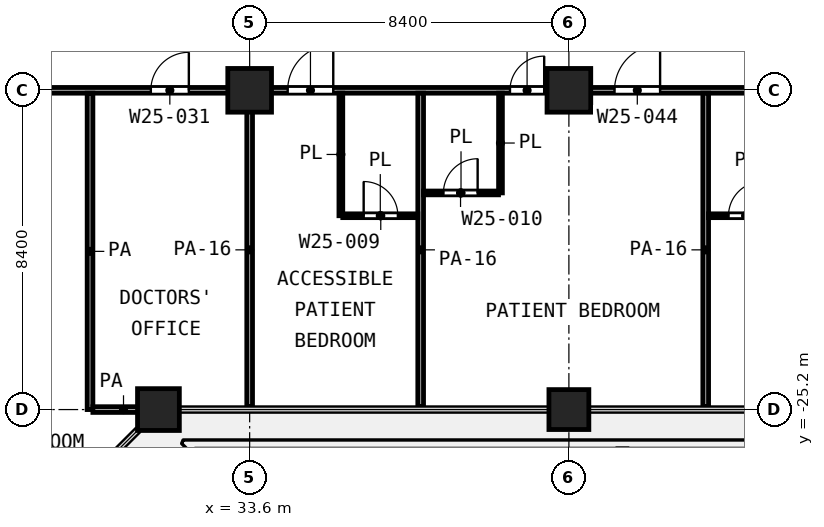
"""IFC4 building model, lengths in metres.
Left out: names, types, materials, properties, quantities, classifications, styles, units other than length and angle.
Written with IfcOpenShell. Run it as: python <this file> out.ifc"""

import sys

from ifc_helpers import new_model, si_unit, direction, frame, frame_2d, origin, origin_2d, place, context, subcontext, project, spatial, rectangle, extrude, element, fill, save


model = new_model("IFC4")
c1 = context("Model", 3, precision=1e-05, world=origin(), true_north=direction((0.0, 1.0)))
c2 = subcontext(c1, "Body", "Model", "MODEL_VIEW")
j1 = project(units=[si_unit("LENGTHUNIT", "METRE"), si_unit("PLANEANGLEUNIT", "RADIAN")], contexts=[c1])
p1 = place(None, origin())
s1 = spatial("IfcSite", under=j1, at=p1, CompositionType="ELEMENT")
p2 = place(p1, origin())
s2 = spatial("IfcBuilding", under=s1, at=p2, CompositionType="ELEMENT")
p3 = place(p2, frame((0.0, 0.0, 111.4)))
s3 = spatial("IfcBuildingStorey", under=s2, at=p3, CompositionType="ELEMENT", Elevation=111.4)
for number, where, z_axis, x_axis in (
    (1, (33.6, -16.8, 0.0), (0.0, 0.0, 1.0), (1.0, 0.0, 0.0)),
    (2, (42.0, -16.8, 0.0), (0.0, 0.0, 1.0), (1.0, 0.0, 0.0)),
):
    element("IfcColumn", number, at=place(p3, frame(where, z_axis=z_axis, x_axis=x_axis)), inside=s3, PredefinedType="COLUMN", context=c2, shape_type="SweptSolid", body=[
        extrude(rectangle(XDim=1.15, YDim=1.15, at=origin_2d()), origin(), (0.0, 0.0, 1.0), 4.2),
    ])
p4 = place(p3, frame((31.2, -25.2, 0.0), z_axis=(0.0, 0.0, 1.0), x_axis=(1.0, 0.0, 0.0)))
e3 = element("IfcColumn", 3, at=p4, inside=s3, PredefinedType="COLUMN", context=c2, shape_type="SweptSolid", body=[
    extrude(rectangle(XDim=1.1, YDim=1.1, at=origin_2d()), origin(), (0.0, 0.0, 1.0), 4.2),
])
p5 = place(p3, frame((42.0, -25.2, 0.0), z_axis=(0.0, 0.0, 1.0), x_axis=(1.0, 0.0, 0.0)))
e4 = element("IfcColumn", 4, at=p5, inside=s3, PredefinedType="COLUMN", context=c2, shape_type="SweptSolid", body=[
    extrude(rectangle(XDim=1.05, YDim=1.05, at=origin_2d()), origin(), (0.0, 0.0, 1.0), 4.2),
])
p6 = place(p3, frame((36.05, -20.1, 0.0), z_axis=(0.0, 0.0, 1.0), x_axis=(1.0, 0.0, 0.0)))
e5 = element("IfcWall", 5, at=p6, inside=s3, PredefinedType="PARTITIONING", context=c2, shape_type="SweptSolid", body=[
    extrude(rectangle(XDim=1.975, YDim=0.1, at=frame_2d((0.987, 0.0))), origin(), (0.0, 0.0, 1.0), 3.6),
])
p7 = place(p6, frame((0.55, 0.0, 0.0)))
e6 = element("IfcOpeningElement", 6, at=p7, cuts=e5, PredefinedType="OPENING", context=c2, shape_type="SweptSolid", body=[
    extrude(rectangle(XDim=0.9, YDim=2.1, at=frame_2d((0.45, 1.05))), frame((0.0, 0.06, 0.0), z_axis=(0.0, -1.0, 0.0), x_axis=(1.0, 0.0, 0.0)), (0.0, 0.0, 1.0), 0.12),
])
p8 = place(p3, frame((45.675, -20.1, 0.0), z_axis=(0.0, 0.0, 1.0), x_axis=(1.0, 0.0, 0.0)))
e7 = element("IfcWall", 7, at=p8, inside=s3, PredefinedType="PARTITIONING", context=c2, shape_type="SweptSolid", body=[
    extrude(rectangle(XDim=1.975, YDim=0.1, at=frame_2d((0.987, 0.0))), origin(), (0.0, 0.0, 1.0), 3.6),
])
p9 = place(p8, frame((0.525, 0.0, 0.0)))
e8 = element("IfcOpeningElement", 8, at=p9, cuts=e7, PredefinedType="OPENING", context=c2, shape_type="SweptSolid", body=[
    extrude(rectangle(XDim=0.9, YDim=2.1, at=frame_2d((0.45, 1.05))), frame((0.0, 0.06, 0.0), z_axis=(0.0, -1.0, 0.0), x_axis=(1.0, 0.0, 0.0)), (0.0, 0.0, 1.0), 0.12),
])
p10 = place(p3, frame((38.175, -19.5, 0.0), z_axis=(0.0, 0.0, 1.0), x_axis=(1.0, 0.0, 0.0)))
e9 = element("IfcWall", 9, at=p10, inside=s3, PredefinedType="PARTITIONING", context=c2, shape_type="SweptSolid", body=[
    extrude(rectangle(XDim=1.973, YDim=0.1, at=frame_2d((0.986, 0.0))), origin(), (0.0, 0.0, 1.0), 3.6),
])
p11 = place(p10, frame((0.524, 0.0, 0.0)))
e10 = element("IfcOpeningElement", 10, at=p11, cuts=e9, PredefinedType="OPENING", context=c2, shape_type="SweptSolid", body=[
    extrude(rectangle(XDim=0.9, YDim=2.1, at=frame_2d((0.45, 1.05))), frame((0.0, 0.06, 0.0), z_axis=(0.0, -1.0, 0.0), x_axis=(1.0, 0.0, 0.0)), (0.0, 0.0, 1.0), 0.12),
])
p12 = place(p3, frame((36.0, -20.1, 0.0), z_axis=(0.0, 0.0, 1.0), x_axis=(0.0, 1.0, 0.0)))
e11 = element("IfcWall", 11, at=p12, inside=s3, PredefinedType="PARTITIONING", context=c2, shape_type="SweptSolid", body=[
    extrude(rectangle(XDim=3.225, YDim=0.1, at=frame_2d((1.613, 0.0))), origin(), (0.0, 0.0, 1.0), 3.6),
])
p13 = place(p3, frame((40.2, -19.499, 0.0), z_axis=(0.0, 0.0, 1.0), x_axis=(0.0, 1.0, 0.0)))
e12 = element("IfcWall", 12, at=p13, inside=s3, PredefinedType="PARTITIONING", context=c2, shape_type="SweptSolid", body=[
    extrude(rectangle(XDim=2.624, YDim=0.1, at=frame_2d((1.312, 0.0))), origin(), (0.0, 0.0, 1.0), 3.6),
])
p14 = place(p3, frame((29.475, -25.2, 0.0), z_axis=(0.0, 0.0, 1.0), x_axis=(1.0, 0.0, 0.0)))
e13 = element("IfcWall", 13, at=p14, inside=s3, PredefinedType="PARTITIONING", context=c2, shape_type="SweptSolid", body=[
    extrude(rectangle(XDim=1.612, YDim=0.15, at=frame_2d((0.806, 0.0))), origin(), (0.0, 0.0, 1.0), 3.6),
])
p15 = place(p3, frame((25.0, -16.8, 0.0), z_axis=(0.0, 0.0, 1.0), x_axis=(1.0, 0.0, 0.0)))
e14 = element("IfcWall", 14, at=p15, inside=s3, PredefinedType="PARTITIONING", context=c2, shape_type="SweptSolid", body=[
    extrude(rectangle(XDim=50.52, YDim=0.15, at=frame_2d((25.26, 0.0))), origin(), (0.0, 0.0, 1.0), 3.6),
])
p16 = place(p15, frame((1.55, 0.0, 0.0)))
e15 = element("IfcOpeningElement", 15, at=p16, cuts=e14, PredefinedType="OPENING", context=c2, shape_type="SweptSolid", body=[
    extrude(rectangle(XDim=1.5, YDim=2.1, at=frame_2d((0.75, 1.05))), frame((0.0, 0.085, 0.0), z_axis=(0.0, -1.0, 0.0), x_axis=(1.0, 0.0, 0.0)), (0.0, 0.0, 1.0), 0.17),
])
p17 = place(p15, frame((6.0, 0.0, 0.0)))
e16 = element("IfcOpeningElement", 16, at=p17, cuts=e14, PredefinedType="OPENING", context=c2, shape_type="SweptSolid", body=[
    extrude(rectangle(XDim=1.0, YDim=2.1, at=frame_2d((0.5, 1.05))), frame((0.0, 0.085, 0.0), z_axis=(0.0, -1.0, 0.0), x_axis=(1.0, 0.0, 0.0)), (0.0, 0.0, 1.0), 0.17),
])
p18 = place(p15, frame((9.6, 0.0, 0.0)))
e17 = element("IfcOpeningElement", 17, at=p18, cuts=e14, PredefinedType="OPENING", context=c2, shape_type="SweptSolid", body=[
    extrude(rectangle(XDim=1.2, YDim=2.1, at=frame_2d((0.6, 1.05))), frame((0.0, 0.085, 0.0), z_axis=(0.0, -1.0, 0.0), x_axis=(1.0, 0.0, 0.0)), (0.0, 0.0, 1.0), 0.17),
])
p19 = place(p15, frame((18.2, 0.0, 0.0)))
e18 = element("IfcOpeningElement", 18, at=p19, cuts=e14, PredefinedType="OPENING", context=c2, shape_type="SweptSolid", body=[
    extrude(rectangle(XDim=1.2, YDim=2.1, at=frame_2d((0.6, 1.05))), frame((0.0, 0.085, 0.0), z_axis=(0.0, -1.0, 0.0), x_axis=(1.0, 0.0, 0.0)), (0.0, 0.0, 1.0), 0.17),
])
p20 = place(p15, frame((15.45, 0.0, 0.0)))
e19 = element("IfcOpeningElement", 19, at=p20, cuts=e14, PredefinedType="OPENING", context=c2, shape_type="SweptSolid", body=[
    extrude(rectangle(XDim=0.9, YDim=2.1, at=frame_2d((0.45, 1.05))), frame((0.0, 0.085, 0.0), z_axis=(0.0, -1.0, 0.0), x_axis=(1.0, 0.0, 0.0)), (0.0, 0.0, 1.0), 0.17),
])
p21 = place(p15, frame((23.6, 0.0, 0.0)))
e20 = element("IfcOpeningElement", 20, at=p21, cuts=e14, PredefinedType="OPENING", context=c2, shape_type="SweptSolid", body=[
    extrude(rectangle(XDim=1.2, YDim=2.1, at=frame_2d((0.6, 1.05))), frame((0.0, 0.085, 0.0), z_axis=(0.0, -1.0, 0.0), x_axis=(1.0, 0.0, 0.0)), (0.0, 0.0, 1.0), 0.17),
])
p22 = place(p15, frame((26.1, 0.0, 0.0)))
e21 = element("IfcOpeningElement", 21, at=p22, cuts=e14, PredefinedType="OPENING", context=c2, shape_type="SweptSolid", body=[
    extrude(rectangle(XDim=1.2, YDim=2.1, at=frame_2d((0.6, 1.05))), frame((0.0, 0.085, 0.0), z_axis=(0.0, -1.0, 0.0), x_axis=(1.0, 0.0, 0.0)), (0.0, 0.0, 1.0), 0.17),
])
p23 = place(p15, frame((32.0, 0.0, 0.0)))
e22 = element("IfcOpeningElement", 22, at=p23, cuts=e14, PredefinedType="OPENING", context=c2, shape_type="SweptSolid", body=[
    extrude(rectangle(XDim=1.2, YDim=2.1, at=frame_2d((0.6, 1.05))), frame((0.0, 0.085, 0.0), z_axis=(0.0, -1.0, 0.0), x_axis=(1.0, 0.0, 0.0)), (0.0, 0.0, 1.0), 0.17),
])
p24 = place(p15, frame((35.0, 0.0, 0.0)))
e23 = element("IfcOpeningElement", 23, at=p24, cuts=e14, PredefinedType="OPENING", context=c2, shape_type="SweptSolid", body=[
    extrude(rectangle(XDim=1.2, YDim=2.1, at=frame_2d((0.6, 1.05))), frame((0.0, 0.085, 0.0), z_axis=(0.0, -1.0, 0.0), x_axis=(1.0, 0.0, 0.0)), (0.0, 0.0, 1.0), 0.17),
])
p25 = place(p15, frame((40.4, 0.0, 0.0)))
e24 = element("IfcOpeningElement", 24, at=p25, cuts=e14, PredefinedType="OPENING", context=c2, shape_type="SweptSolid", body=[
    extrude(rectangle(XDim=1.2, YDim=2.1, at=frame_2d((0.6, 1.05))), frame((0.0, 0.085, 0.0), z_axis=(0.0, -1.0, 0.0), x_axis=(1.0, 0.0, 0.0)), (0.0, 0.0, 1.0), 0.17),
])
p26 = place(p15, frame((38.8, 0.0, 0.0)))
e25 = element("IfcOpeningElement", 25, at=p26, cuts=e14, PredefinedType="OPENING", context=c2, shape_type="SweptSolid", body=[
    extrude(rectangle(XDim=1.2, YDim=2.1, at=frame_2d((0.6, 1.05))), frame((0.0, 0.085, 0.0), z_axis=(0.0, -1.0, 0.0), x_axis=(1.0, 0.0, 0.0)), (0.0, 0.0, 1.0), 0.17),
])
p27 = place(p15, frame((47.85, 0.0, 0.0)))
e26 = element("IfcOpeningElement", 26, at=p27, cuts=e14, PredefinedType="OPENING", context=c2, shape_type="SweptSolid", body=[
    extrude(rectangle(XDim=1.0, YDim=2.1, at=frame_2d((0.5, 1.05))), frame((0.0, 0.085, 0.0), z_axis=(0.0, -1.0, 0.0), x_axis=(1.0, 0.0, 0.0)), (0.0, 0.0, 1.0), 0.17),
])
p28 = place(p3, frame((29.4, -25.2, 0.0), z_axis=(0.0, 0.0, 1.0), x_axis=(0.0, 1.0, 0.0)))
e27 = element("IfcWall", 27, at=p28, inside=s3, PredefinedType="PARTITIONING", context=c2, shape_type="SweptSolid", body=[
    extrude(rectangle(XDim=8.325, YDim=0.15, at=frame_2d((4.163, 0.0))), origin(), (0.0, 0.0, 1.0), 3.6),
])
for number, where, z_axis, x_axis in (
    (28, (33.6, -25.12, 0.0), (0.0, 0.0, 1.0), (0.0, 1.0, 0.0)),
    (29, (38.1, -25.12, 0.0), (0.0, 0.0, 1.0), (0.0, 1.0, 0.0)),
    (30, (45.6, -25.12, 0.0), (0.0, 0.0, 1.0), (0.0, 1.0, 0.0)),
):
    element("IfcWall", number, at=place(p3, frame(where, z_axis=z_axis, x_axis=x_axis)), inside=s3, PredefinedType="PARTITIONING", context=c2, shape_type="SweptSolid", body=[
        extrude(rectangle(XDim=8.245, YDim=0.15, at=frame_2d((4.123, 0.0))), origin(), (0.0, 0.0, 1.0), 2.7),
    ])
p29 = place(p17, origin())
e31 = element("IfcDoor", 31, at=p29, inside=s3, OperationType="SINGLE_SWING_RIGHT", PredefinedType="DOOR", context=c2, shape_type="SweptSolid", body=[
    extrude(rectangle(XDim=1.0, YDim=2.1, at=frame_2d((0.5, 1.05))), frame((0.0, 0.025, 0.0), z_axis=(0.0, -1.0, 0.0), x_axis=(1.0, 0.0, 0.0)), (0.0, 0.0, 1.0), 0.05),
])
fill(e16, e31)
p30 = place(p18, origin())
e32 = element("IfcDoor", 32, at=p30, inside=s3, OperationType="SINGLE_SWING_RIGHT", PredefinedType="DOOR", context=c2, shape_type="SweptSolid", body=[
    extrude(rectangle(XDim=1.2, YDim=2.1, at=frame_2d((0.6, 1.05))), frame((0.0, 0.025, 0.0), z_axis=(0.0, -1.0, 0.0), x_axis=(1.0, 0.0, 0.0)), (0.0, 0.0, 1.0), 0.05),
])
fill(e17, e32)
p31 = place(p7, origin())
e33 = element("IfcDoor", 33, at=p31, inside=s3, OperationType="SINGLE_SWING_LEFT", PredefinedType="DOOR", context=c2, shape_type="SweptSolid", body=[
    extrude(rectangle(XDim=0.9, YDim=2.1, at=frame_2d((0.45, 1.05))), frame((0.0, 0.025, 0.0), z_axis=(0.0, -1.0, 0.0), x_axis=(1.0, 0.0, 0.0)), (0.0, 0.0, 1.0), 0.05),
])
fill(e6, e33)
p32 = place(p19, origin())
e34 = element("IfcDoor", 34, at=p32, inside=s3, OperationType="SINGLE_SWING_RIGHT", PredefinedType="DOOR", context=c2, shape_type="SweptSolid", body=[
    extrude(rectangle(XDim=1.2, YDim=2.1, at=frame_2d((0.6, 1.05))), frame((0.0, 0.025, 0.0), z_axis=(0.0, -1.0, 0.0), x_axis=(1.0, 0.0, 0.0)), (0.0, 0.0, 1.0), 0.05),
])
fill(e18, e34)
p33 = place(p20, origin())
e35 = element("IfcDoor", 35, at=p33, inside=s3, OperationType="SINGLE_SWING_RIGHT", PredefinedType="DOOR", context=c2, shape_type="SweptSolid", body=[
    extrude(rectangle(XDim=0.9, YDim=2.1, at=frame_2d((0.45, 1.05))), frame((0.0, 0.025, 0.0), z_axis=(0.0, -1.0, 0.0), x_axis=(1.0, 0.0, 0.0)), (0.0, 0.0, 1.0), 0.05),
])
fill(e19, e35)
p34 = place(p11, origin())
e36 = element("IfcDoor", 36, at=p34, inside=s3, OperationType="SINGLE_SWING_RIGHT", PredefinedType="DOOR", context=c2, shape_type="SweptSolid", body=[
    extrude(rectangle(XDim=0.9, YDim=2.1, at=frame_2d((0.45, 1.05))), frame((0.0, 0.025, 0.0), z_axis=(0.0, -1.0, 0.0), x_axis=(1.0, 0.0, 0.0)), (0.0, 0.0, 1.0), 0.05),
])
fill(e10, e36)
p35 = place(p9, origin())
e37 = element("IfcDoor", 37, at=p35, inside=s3, OperationType="SINGLE_SWING_RIGHT", PredefinedType="DOOR", context=c2, shape_type="SweptSolid", body=[
    extrude(rectangle(XDim=0.9, YDim=2.1, at=frame_2d((0.45, 1.05))), frame((0.0, 0.025, 0.0), z_axis=(0.0, -1.0, 0.0), x_axis=(1.0, 0.0, 0.0)), (0.0, 0.0, 1.0), 0.05),
])
fill(e8, e37)
save(model, sys.argv[1])
